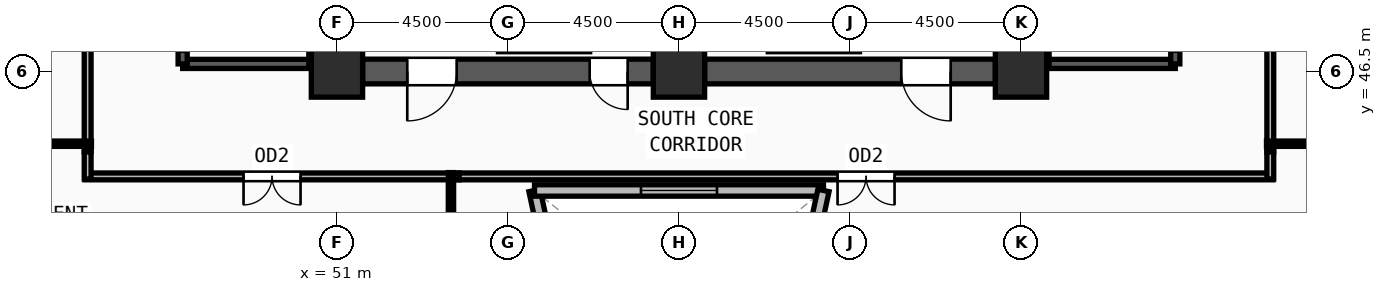
"""IFC4 building model, lengths in metres.
Left out: names, types, materials, properties, quantities, classifications, styles, units other than length and angle.
Written with IfcOpenShell. Run it as: python <this file> out.ifc"""

import sys

from ifc_helpers import new_model, si_unit, direction, frame, frame_2d, origin, origin_2d, place, context, subcontext, project, spatial, rectangle, extrude, source, transform, mapped, element, fill, save


model = new_model("IFC4")
c1 = context("Model", 3, precision=1e-05, world=origin(), true_north=direction((0.0, 1.0)))
c2 = subcontext(c1, "Body", "Model", "MODEL_VIEW")
j1 = project(units=[si_unit("LENGTHUNIT", "METRE"), si_unit("PLANEANGLEUNIT", "RADIAN")], contexts=[c1])
p1 = place(None, origin())
s1 = spatial("IfcSite", under=j1, at=p1, CompositionType="ELEMENT")
p2 = place(p1, origin())
s2 = spatial("IfcBuilding", under=s1, at=p2, CompositionType="ELEMENT")
p3 = place(p2, frame((0.0, 0.0, 213.0)))
s3 = spatial("IfcBuildingStorey", under=s2, at=p3, CompositionType="ELEMENT", Elevation=213.0)
m1 = source(origin(), c2, "Body", "SweptSolid", [
    extrude(rectangle(XDim=1.35, YDim=1.35, at=origin_2d()), origin(), (0.0, 0.0, 1.0), 3.75),
])
for number, where, z_axis, x_axis in (
    (1, (51.0, 46.5, 0.0), (0.0, 0.0, 1.0), (1.0, 0.0, 0.0)),
    (2, (60.0, 46.5, 0.0), (0.0, 0.0, 1.0), (1.0, 0.0, 0.0)),
    (3, (69.0, 46.5, 0.0), (0.0, 0.0, 1.0), (1.0, 0.0, 0.0)),
):
    element("IfcColumn", number, at=place(p3, frame(where, z_axis=z_axis, x_axis=x_axis)), inside=s3, PredefinedType="COLUMN", context=c2, shape_type="MappedRepresentation", body=[
        mapped(m1, transform((0.0, 0.0, 0.0), x_axis=(1.0, 0.0, 0.0), y_axis=(0.0, 1.0, 0.0), z_axis=(0.0, 0.0, 1.0), scale=1.0)),
    ])
p4 = place(p3, frame((37.976, 43.541, 0.0), z_axis=(0.0, 0.0, 1.0), x_axis=(0.552730970618, -0.833359750719, 0.0)))
e4 = element("IfcWall", 4, at=p4, inside=s3, PredefinedType="SOLIDWALL", context=c2, shape_type="SweptSolid", body=[
    extrude(rectangle(XDim=29.349, YDim=0.38, at=frame_2d((14.674, 0.0))), origin(), (0.0, 0.0, 1.0), 3.57),
])
m2 = source(origin(), c2, "Body", "SweptSolid", [
    extrude(rectangle(XDim=1.5, YDim=1.9, at=frame_2d((0.75, 0.95))), frame((0.0, 0.2, 0.0), z_axis=(0.0, -1.0, 0.0), x_axis=(1.0, 0.0, 0.0)), (0.0, 0.0, 1.0), 0.4),
])
p5 = place(p4, frame((6.587, 0.0, 0.55)))
e5 = element("IfcOpeningElement", 5, at=p5, cuts=e4, PredefinedType="OPENING", context=c2, shape_type="MappedRepresentation", body=[
    mapped(m2, transform((0.0, 0.0, 0.0), x_axis=(1.0, 0.0, 0.0), y_axis=(0.0, 1.0, 0.0), z_axis=(0.0, 0.0, 1.0), scale=1.0)),
])
p6 = place(p4, frame((13.924, 0.0, 0.55)))
e6 = element("IfcOpeningElement", 6, at=p6, cuts=e4, PredefinedType="OPENING", context=c2, shape_type="MappedRepresentation", body=[
    mapped(m2, transform((0.0, 0.0, 0.0), x_axis=(1.0, 0.0, 0.0), y_axis=(0.0, 1.0, 0.0), z_axis=(0.0, 0.0, 1.0), scale=1.0)),
])
p7 = place(p4, frame((21.262, 0.0, 0.55)))
e7 = element("IfcOpeningElement", 7, at=p7, cuts=e4, PredefinedType="OPENING", context=c2, shape_type="MappedRepresentation", body=[
    mapped(m2, transform((0.0, 0.0, 0.0), x_axis=(1.0, 0.0, 0.0), y_axis=(0.0, 1.0, 0.0), z_axis=(0.0, 0.0, 1.0), scale=1.0)),
])
p8 = place(p3, frame((68.325, 46.5, 0.0), z_axis=(0.0, 0.0, 1.0), x_axis=(-1.0, 0.0, 0.0)))
e8 = element("IfcWall", 8, at=p8, inside=s3, PredefinedType="SHEAR", context=c2, shape_type="SweptSolid", body=[
    extrude(rectangle(XDim=7.65, YDim=0.65, at=frame_2d((3.825, 0.0))), origin(), (0.0, 0.0, 1.0), 3.57),
])
m3 = source(origin(), c2, "Body", "SweptSolid", [
    extrude(rectangle(XDim=1.3, YDim=2.2, at=frame_2d((0.65, 1.1))), frame((0.0, 0.335, 0.0), z_axis=(0.0, -1.0, 0.0), x_axis=(1.0, 0.0, 0.0)), (0.0, 0.0, 1.0), 0.67),
])
p9 = place(p8, frame((1.175, 0.0, 0.0)))
e9 = element("IfcOpeningElement", 9, at=p9, cuts=e8, PredefinedType="OPENING", context=c2, shape_type="MappedRepresentation", body=[
    mapped(m3, transform((0.0, 0.0, 0.0), x_axis=(1.0, 0.0, 0.0), y_axis=(0.0, 1.0, 0.0), z_axis=(0.0, 0.0, 1.0), scale=1.0)),
])
p10 = place(p3, frame((59.325, 46.5, 0.0), z_axis=(0.0, 0.0, 1.0), x_axis=(-1.0, 0.0, 0.0)))
e10 = element("IfcWall", 10, at=p10, inside=s3, PredefinedType="SHEAR", context=c2, shape_type="SweptSolid", body=[
    extrude(rectangle(XDim=7.65, YDim=0.65, at=frame_2d((3.825, 0.0))), origin(), (0.0, 0.0, 1.0), 3.57),
])
p11 = place(p10, frame((5.175, 0.0, 0.0)))
e11 = element("IfcOpeningElement", 11, at=p11, cuts=e10, PredefinedType="OPENING", context=c2, shape_type="MappedRepresentation", body=[
    mapped(m3, transform((0.0, 0.0, 0.0), x_axis=(1.0, 0.0, 0.0), y_axis=(0.0, 1.0, 0.0), z_axis=(0.0, 0.0, 1.0), scale=1.0)),
])
m4 = source(origin(), c2, "Body", "SweptSolid", [
    extrude(rectangle(XDim=1.0, YDim=2.2, at=frame_2d((0.5, 1.1))), frame((0.0, 0.335, 0.0), z_axis=(0.0, -1.0, 0.0), x_axis=(1.0, 0.0, 0.0)), (0.0, 0.0, 1.0), 0.67),
])
p12 = place(p10, frame((0.675, 0.0, 0.0)))
e12 = element("IfcOpeningElement", 12, at=p12, cuts=e10, PredefinedType="OPENING", context=c2, shape_type="MappedRepresentation", body=[
    mapped(m4, transform((0.0, 0.0, 0.0), x_axis=(1.0, 0.0, 0.0), y_axis=(0.0, 1.0, 0.0), z_axis=(0.0, 0.0, 1.0), scale=1.0)),
])
p13 = place(p3, frame((46.94, 46.7, 0.0), z_axis=(0.0, 0.0, 1.0), x_axis=(1.0, 0.0, 0.0)))
e13 = element("IfcWall", 13, at=p13, inside=s3, PredefinedType="SOLIDWALL", context=c2, shape_type="SweptSolid", body=[
    extrude(rectangle(XDim=3.44, YDim=0.24, at=frame_2d((1.72, 0.0))), origin(), (0.0, 0.0, 1.0), 3.57),
])
p14 = place(p3, frame((50.38, 46.7, 0.0), z_axis=(0.0, 0.0, 1.0), x_axis=(0.0, 1.0, 0.0)))
e14 = element("IfcWall", 14, at=p14, inside=s3, PredefinedType="SOLIDWALL", context=c2, shape_type="SweptSolid", body=[
    extrude(rectangle(XDim=7.82, YDim=0.24, at=frame_2d((3.91, 0.0))), origin(), (0.0, 0.0, 1.0), 3.57),
])
p15 = place(p3, frame((46.94, 54.52, 0.0), z_axis=(0.0, 0.0, 1.0), x_axis=(0.0, -1.0, 0.0)))
e15 = element("IfcWall", 15, at=p15, inside=s3, PredefinedType="SOLIDWALL", context=c2, shape_type="SweptSolid", body=[
    extrude(rectangle(XDim=7.82, YDim=0.24, at=frame_2d((3.91, 0.0))), origin(), (0.0, 0.0, 1.0), 3.57),
])
m5 = source(origin(), c2, "Body", "SweptSolid", [
    extrude(rectangle(XDim=1.2, YDim=2.2, at=frame_2d((0.6, 1.1))), frame((0.0, 0.13, 0.0), z_axis=(0.0, -1.0, 0.0), x_axis=(1.0, 0.0, 0.0)), (0.0, 0.0, 1.0), 0.26),
])
p16 = place(p15, frame((6.3, 0.0, 0.0)))
e16 = element("IfcOpeningElement", 16, at=p16, cuts=e15, PredefinedType="OPENING", context=c2, shape_type="MappedRepresentation", body=[
    mapped(m5, transform((0.0, 0.0, 0.0), x_axis=(1.0, 0.0, 0.0), y_axis=(0.0, 1.0, 0.0), z_axis=(0.0, 0.0, 1.0), scale=1.0)),
])
p17 = place(p3, frame((69.62, 46.7, 0.0), z_axis=(0.0, 0.0, 1.0), x_axis=(1.0, 0.0, 0.0)))
e17 = element("IfcWall", 17, at=p17, inside=s3, PredefinedType="SOLIDWALL", context=c2, shape_type="SweptSolid", body=[
    extrude(rectangle(XDim=3.44, YDim=0.24, at=frame_2d((1.72, 0.0))), origin(), (0.0, 0.0, 1.0), 3.57),
])
p18 = place(p3, frame((73.06, 46.7, 0.0), z_axis=(0.0, 0.0, 1.0), x_axis=(0.0, 1.0, 0.0)))
e18 = element("IfcWall", 18, at=p18, inside=s3, PredefinedType="SOLIDWALL", context=c2, shape_type="SweptSolid", body=[
    extrude(rectangle(XDim=7.82, YDim=0.24, at=frame_2d((3.91, 0.0))), origin(), (0.0, 0.0, 1.0), 3.57),
])
p19 = place(p18, frame((0.32, 0.0, 0.0)))
e19 = element("IfcOpeningElement", 19, at=p19, cuts=e18, PredefinedType="OPENING", context=c2, shape_type="MappedRepresentation", body=[
    mapped(m5, transform((0.0, 0.0, 0.0), x_axis=(1.0, 0.0, 0.0), y_axis=(0.0, 1.0, 0.0), z_axis=(0.0, 0.0, 1.0), scale=1.0)),
])
p20 = place(p3, frame((69.62, 54.52, 0.0), z_axis=(0.0, 0.0, 1.0), x_axis=(0.0, -1.0, 0.0)))
e20 = element("IfcWall", 20, at=p20, inside=s3, PredefinedType="SOLIDWALL", context=c2, shape_type="SweptSolid", body=[
    extrude(rectangle(XDim=7.82, YDim=0.24, at=frame_2d((3.91, 0.0))), origin(), (0.0, 0.0, 1.0), 3.57),
])
p21 = place(p3, frame((57.529, 37.216, 0.0), z_axis=(0.0, 0.0, 1.0), x_axis=(-0.21140087136, 0.97739944321, 0.0)))
e21 = element("IfcWall", 21, at=p21, inside=s3, PredefinedType="SOLIDWALL", context=c2, shape_type="SweptSolid", body=[
    extrude(rectangle(XDim=6.296, YDim=0.3, at=frame_2d((3.148, 0.0))), origin(), (0.0, 0.0, 1.0), 3.57),
])
m6 = source(origin(), c2, "Body", "SweptSolid", [
    extrude(rectangle(XDim=2.0, YDim=1.9, at=frame_2d((1.0, 0.95))), frame((0.0, 0.16, 0.0), z_axis=(0.0, -1.0, 0.0), x_axis=(1.0, 0.0, 0.0)), (0.0, 0.0, 1.0), 0.32),
])
p22 = place(p21, frame((2.148, 0.0, 0.55)))
e22 = element("IfcOpeningElement", 22, at=p22, cuts=e21, PredefinedType="OPENING", context=c2, shape_type="MappedRepresentation", body=[
    mapped(m6, transform((0.0, 0.0, 0.0), x_axis=(1.0, 0.0, 0.0), y_axis=(0.0, 1.0, 0.0), z_axis=(0.0, 0.0, 1.0), scale=1.0)),
])
p23 = place(p3, frame((56.198, 43.37, 0.0), z_axis=(0.0, 0.0, 1.0), x_axis=(1.0, 0.0, 0.0)))
e23 = element("IfcWall", 23, at=p23, inside=s3, PredefinedType="SOLIDWALL", context=c2, shape_type="SweptSolid", body=[
    extrude(rectangle(XDim=7.604, YDim=0.3, at=frame_2d((3.802, 0.0))), origin(), (0.0, 0.0, 1.0), 3.57),
])
p24 = place(p23, frame((2.802, 0.0, 0.55)))
e24 = element("IfcOpeningElement", 24, at=p24, cuts=e23, PredefinedType="OPENING", context=c2, shape_type="MappedRepresentation", body=[
    mapped(m6, transform((0.0, 0.0, 0.0), x_axis=(1.0, 0.0, 0.0), y_axis=(0.0, 1.0, 0.0), z_axis=(0.0, 0.0, 1.0), scale=1.0)),
])
p25 = place(p3, frame((63.802, 43.37, 0.0), z_axis=(0.0, 0.0, 1.0), x_axis=(-0.21140087136, -0.97739944321, 0.0)))
e25 = element("IfcWall", 25, at=p25, inside=s3, PredefinedType="SOLIDWALL", context=c2, shape_type="SweptSolid", body=[
    extrude(rectangle(XDim=6.296, YDim=0.3, at=frame_2d((3.148, 0.0))), origin(), (0.0, 0.0, 1.0), 3.57),
])
p26 = place(p25, frame((2.148, 0.0, 0.55)))
e26 = element("IfcOpeningElement", 26, at=p26, cuts=e25, PredefinedType="OPENING", context=c2, shape_type="MappedRepresentation", body=[
    mapped(m6, transform((0.0, 0.0, 0.0), x_axis=(1.0, 0.0, 0.0), y_axis=(0.0, 1.0, 0.0), z_axis=(0.0, 0.0, 1.0), scale=1.0)),
])
p27 = place(p3, frame((54.215, 43.74, 0.0), z_axis=(0.0, 0.0, 1.0), x_axis=(-1.0, 0.0, 0.0)))
e27 = element("IfcWall", 27, at=p27, inside=s3, PredefinedType="PARTITIONING", context=c2, shape_type="SweptSolid", body=[
    extrude(rectangle(XDim=9.845, YDim=0.18, at=frame_2d((4.922, 0.0))), origin(), (0.0, 0.0, 1.0), 3.57),
])
m7 = source(origin(), c2, "Body", "SweptSolid", [
    extrude(rectangle(XDim=1.5, YDim=2.2, at=frame_2d((0.75, 1.1))), frame((0.0, 0.1, 0.0), z_axis=(0.0, -1.0, 0.0), x_axis=(1.0, 0.0, 0.0)), (0.0, 0.0, 1.0), 0.2),
])
p28 = place(p27, frame((4.173, 0.0, 0.0)))
e28 = element("IfcOpeningElement", 28, at=p28, cuts=e27, PredefinedType="OPENING", context=c2, shape_type="MappedRepresentation", body=[
    mapped(m7, transform((0.0, 0.0, 0.0), x_axis=(1.0, 0.0, 0.0), y_axis=(0.0, 1.0, 0.0), z_axis=(0.0, 0.0, 1.0), scale=1.0)),
])
p29 = place(p3, frame((75.63, 43.74, 0.0), z_axis=(0.0, 0.0, 1.0), x_axis=(-1.0, 0.0, 0.0)))
e29 = element("IfcWall", 29, at=p29, inside=s3, PredefinedType="PARTITIONING", context=c2, shape_type="SweptSolid", body=[
    extrude(rectangle(XDim=21.415, YDim=0.18, at=frame_2d((10.708, 0.0))), origin(), (0.0, 0.0, 1.0), 3.57),
])
p30 = place(p29, frame((9.957, 0.0, 0.0)))
e30 = element("IfcOpeningElement", 30, at=p30, cuts=e29, PredefinedType="OPENING", context=c2, shape_type="MappedRepresentation", body=[
    mapped(m7, transform((0.0, 0.0, 0.0), x_axis=(1.0, 0.0, 0.0), y_axis=(0.0, 1.0, 0.0), z_axis=(0.0, 0.0, 1.0), scale=1.0)),
])
p31 = place(p3, frame((75.56, 52.285, 0.0), z_axis=(0.0, 0.0, 1.0), x_axis=(0.0, -1.0, 0.0)))
e31 = element("IfcWall", 31, at=p31, inside=s3, PredefinedType="PARTITIONING", context=c2, shape_type="SweptSolid", body=[
    extrude(rectangle(XDim=7.9, YDim=0.18, at=frame_2d((3.95, 0.0))), origin(), (0.0, 0.0, 1.0), 3.57),
])
m8 = source(origin(), c2, "Body", "SweptSolid", [
    extrude(rectangle(XDim=1.0, YDim=2.2, at=frame_2d((0.5, 1.1))), frame((0.0, 0.1, 0.0), z_axis=(0.0, -1.0, 0.0), x_axis=(1.0, 0.0, 0.0)), (0.0, 0.0, 1.0), 0.2),
])
p32 = place(p31, frame((3.45, 0.0, 0.0)))
e32 = element("IfcOpeningElement", 32, at=p32, cuts=e31, PredefinedType="OPENING", context=c2, shape_type="MappedRepresentation", body=[
    mapped(m8, transform((0.0, 0.0, 0.0), x_axis=(1.0, 0.0, 0.0), y_axis=(0.0, 1.0, 0.0), z_axis=(0.0, 0.0, 1.0), scale=1.0)),
])
p33 = place(p3, frame((44.44, 44.385, 0.0), z_axis=(0.0, 0.0, 1.0), x_axis=(0.0, 1.0, 0.0)))
e33 = element("IfcWall", 33, at=p33, inside=s3, PredefinedType="PARTITIONING", context=c2, shape_type="SweptSolid", body=[
    extrude(rectangle(XDim=3.825, YDim=0.18, at=frame_2d((1.913, 0.0))), origin(), (0.0, 0.0, 1.0), 3.57),
])
for number, where, z_axis, x_axis in (
    (34, (44.44, 43.67, 0.0), (0.0, 0.0, 1.0), (0.0, 1.0, 0.0)),
    (35, (75.56, 44.385, 0.0), (0.0, 0.0, 1.0), (0.0, -1.0, 0.0)),
):
    element("IfcWall", number, at=place(p3, frame(where, z_axis=z_axis, x_axis=x_axis)), inside=s3, PredefinedType="PARTITIONING", context=c2, shape_type="SweptSolid", body=[
        extrude(rectangle(XDim=0.715, YDim=0.18, at=frame_2d((0.357, 0.0))), origin(), (0.0, 0.0, 1.0), 3.57),
    ])
p34 = place(p3, frame((44.54, 44.6, 0.0), z_axis=(0.0, 0.0, 1.0), x_axis=(-1.0, 0.0, 0.0)))
e36 = element("IfcWall", 36, at=p34, inside=s3, PredefinedType="PARTITIONING", context=c2, shape_type="SweptSolid", body=[
    extrude(rectangle(XDim=7.866, YDim=0.14, at=frame_2d((3.933, 0.0))), origin(), (0.0, 0.0, 1.0), 3.57),
])
p35 = place(p3, frame((75.46, 44.6, 0.0), z_axis=(0.0, 0.0, 1.0), x_axis=(1.0, 0.0, 0.0)))
e37 = element("IfcWall", 37, at=p35, inside=s3, PredefinedType="PARTITIONING", context=c2, shape_type="SweptSolid", body=[
    extrude(rectangle(XDim=7.523, YDim=0.14, at=frame_2d((3.761, 0.0))), origin(), (0.0, 0.0, 1.0), 3.57),
])
p36 = place(p3, frame((54.0, 43.84, 0.0), z_axis=(0.0, 0.0, 1.0), x_axis=(0.0, -1.0, 0.0)))
e38 = element("IfcWall", 38, at=p36, inside=s3, PredefinedType="PARTITIONING", context=c2, shape_type="SweptSolid", body=[
    extrude(rectangle(XDim=25.598, YDim=0.14, at=frame_2d((12.799, 0.0))), origin(), (0.0, 0.0, 1.0), 2.855),
])
m9 = source(origin(), c2, "Body", "SweptSolid", [
    extrude(rectangle(XDim=1.3, YDim=2.2, at=frame_2d((0.65, 1.1))), frame((0.0, 0.025, 0.0), z_axis=(0.0, -1.0, 0.0), x_axis=(1.0, 0.0, 0.0)), (0.0, 0.0, 1.0), 0.05),
])
p37 = place(p11, origin())
e39 = element("IfcDoor", 39, at=p37, inside=s3, OperationType="SINGLE_SWING_RIGHT", PredefinedType="DOOR", context=c2, shape_type="MappedRepresentation", body=[
    mapped(m9, transform((0.0, 0.0, 0.0), x_axis=(1.0, 0.0, 0.0), y_axis=(0.0, 1.0, 0.0), z_axis=(0.0, 0.0, 1.0), scale=1.0)),
])
fill(e11, e39)
m10 = source(origin(), c2, "Body", "SweptSolid", [
    extrude(rectangle(XDim=1.0, YDim=2.2, at=frame_2d((0.5, 1.1))), frame((0.0, 0.025, 0.0), z_axis=(0.0, -1.0, 0.0), x_axis=(1.0, 0.0, 0.0)), (0.0, 0.0, 1.0), 0.05),
])
p38 = place(p12, origin())
e40 = element("IfcDoor", 40, at=p38, inside=s3, OperationType="SINGLE_SWING_LEFT", PredefinedType="DOOR", context=c2, shape_type="MappedRepresentation", body=[
    mapped(m10, transform((0.0, 0.0, 0.0), x_axis=(1.0, 0.0, 0.0), y_axis=(0.0, 1.0, 0.0), z_axis=(0.0, 0.0, 1.0), scale=1.0)),
])
fill(e12, e40)
p39 = place(p9, origin())
e41 = element("IfcDoor", 41, at=p39, inside=s3, OperationType="SINGLE_SWING_LEFT", PredefinedType="DOOR", context=c2, shape_type="MappedRepresentation", body=[
    mapped(m9, transform((0.0, 0.0, 0.0), x_axis=(1.0, 0.0, 0.0), y_axis=(0.0, 1.0, 0.0), z_axis=(0.0, 0.0, 1.0), scale=1.0)),
])
fill(e9, e41)
m11 = source(origin(), c2, "Body", "SweptSolid", [
    extrude(rectangle(XDim=2.0, YDim=1.9, at=frame_2d((1.0, 0.95))), frame((0.0, 0.03, 0.0), z_axis=(0.0, -1.0, 0.0), x_axis=(1.0, 0.0, 0.0)), (0.0, 0.0, 1.0), 0.06),
])
p40 = place(p24, origin())
e42 = element("IfcWindow", 42, at=p40, inside=s3, PartitioningType="DOUBLE_PANEL_VERTICAL", PredefinedType="WINDOW", context=c2, shape_type="MappedRepresentation", body=[
    mapped(m11, transform((0.0, 0.0, 0.0), x_axis=(1.0, 0.0, 0.0), y_axis=(0.0, 1.0, 0.0), z_axis=(0.0, 0.0, 1.0), scale=1.0)),
])
fill(e24, e42)
m12 = source(origin(), c2, "Body", "SweptSolid", [
    extrude(rectangle(XDim=1.5, YDim=2.2, at=frame_2d((0.75, 1.1))), frame((0.0, 0.025, 0.0), z_axis=(0.0, -1.0, 0.0), x_axis=(1.0, 0.0, 0.0)), (0.0, 0.0, 1.0), 0.05),
])
p41 = place(p28, origin())
e43 = element("IfcDoor", 43, at=p41, inside=s3, OperationType="DOUBLE_DOOR_SINGLE_SWING", PredefinedType="DOOR", context=c2, shape_type="MappedRepresentation", body=[
    mapped(m12, transform((0.0, 0.0, 0.0), x_axis=(1.0, 0.0, 0.0), y_axis=(0.0, 1.0, 0.0), z_axis=(0.0, 0.0, 1.0), scale=1.0)),
])
fill(e28, e43)
p42 = place(p30, origin())
e44 = element("IfcDoor", 44, at=p42, inside=s3, OperationType="DOUBLE_DOOR_SINGLE_SWING", PredefinedType="DOOR", context=c2, shape_type="MappedRepresentation", body=[
    mapped(m12, transform((0.0, 0.0, 0.0), x_axis=(1.0, 0.0, 0.0), y_axis=(0.0, 1.0, 0.0), z_axis=(0.0, 0.0, 1.0), scale=1.0)),
])
fill(e30, e44)
save(model, sys.argv[1])
